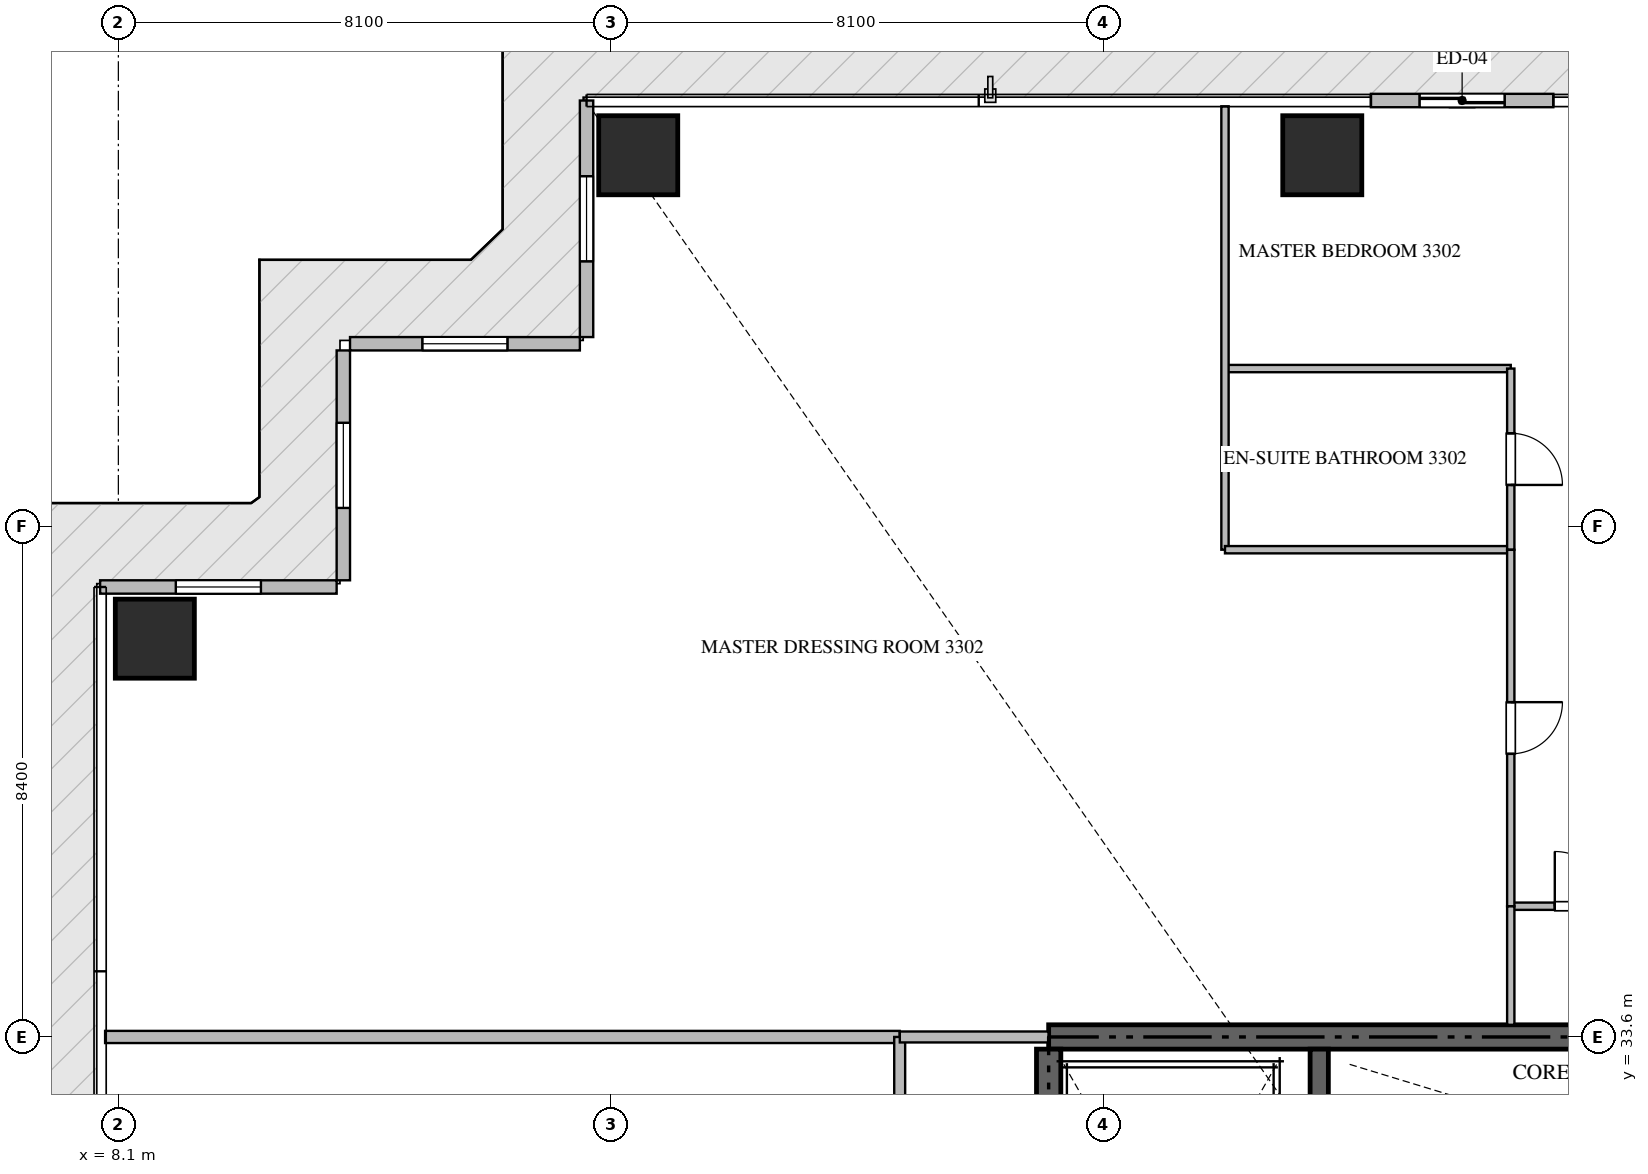
"""IFC4 building model, lengths in metres.
Left out: names, types, materials, properties, quantities, classifications, styles, units other than length and angle.
Written with IfcOpenShell. Run it as: python <this file> out.ifc"""

import sys

from ifc_helpers import new_model, si_unit, direction, frame, frame_2d, origin, origin_2d, place, context, subcontext, project, spatial, rectangle, extrude, source, transform, mapped, element, fill, save


model = new_model("IFC4")
c1 = context("Model", 3, precision=1e-05, world=origin(), true_north=direction((0.0, 1.0)))
c2 = subcontext(c1, "Body", "Model", "MODEL_VIEW")
j1 = project(units=[si_unit("LENGTHUNIT", "METRE"), si_unit("PLANEANGLEUNIT", "RADIAN")], contexts=[c1])
p1 = place(None, origin())
s1 = spatial("IfcSite", under=j1, at=p1, CompositionType="ELEMENT")
p2 = place(p1, origin())
s2 = spatial("IfcBuilding", under=s1, at=p2, CompositionType="ELEMENT")
p3 = place(p2, frame((0.0, 0.0, 135.15)))
s3 = spatial("IfcBuildingStorey", under=s2, at=p3, CompositionType="ELEMENT", Elevation=135.15)
p4 = place(p3, frame((41.4, 33.6, -0.26), z_axis=(0.0, 0.0, 1.0), x_axis=(-1.0, 0.0, 0.0)))
e1 = element("IfcWall", 1, at=p4, inside=s3, PredefinedType="SHEAR", context=c2, shape_type="SweptSolid", body=[
    extrude(rectangle(XDim=18.0, YDim=0.4, at=frame_2d((9.0, 0.0))), origin(), (0.0, 0.0, 1.0), 3.748),
])
p5 = place(p3, frame((23.4, 24.25, -0.26), z_axis=(0.0, 0.0, 1.0), x_axis=(0.0, 1.0, 0.0)))
e2 = element("IfcWall", 2, at=p5, inside=s3, PredefinedType="SHEAR", context=c2, shape_type="SweptSolid", body=[
    extrude(rectangle(XDim=9.15, YDim=0.4, at=frame_2d((4.575, 0.0))), origin(), (0.0, 0.0, 1.0), 3.748),
])
p6 = place(p3, frame((27.85, 23.55, -0.26), z_axis=(0.0, 0.0, 1.0), x_axis=(0.0, 1.0, 0.0)))
e3 = element("IfcWall", 3, at=p6, inside=s3, PredefinedType="SHEAR", context=c2, shape_type="SweptSolid", body=[
    extrude(rectangle(XDim=9.85, YDim=0.3, at=frame_2d((4.925, 0.0))), origin(), (0.0, 0.0, 1.0), 3.748),
])
m1 = source(origin(), c2, "Body", "SweptSolid", [
    extrude(rectangle(XDim=1.3, YDim=1.3, at=origin_2d()), origin(), (0.0, 0.0, 1.0), 3.75),
])
for number, where, z_axis, x_axis in (
    (4, (16.65, 48.1, -0.26), (0.0, 0.0, 1.0), (1.0, 0.0, 0.0)),
    (5, (27.9, 48.1, -0.26), (0.0, 0.0, 1.0), (1.0, 0.0, 0.0)),
    (6, (8.7, 40.15, -0.26), (0.0, 0.0, 1.0), (1.0, 0.0, 0.0)),
):
    element("IfcColumn", number, at=place(p3, frame(where, z_axis=z_axis, x_axis=x_axis)), inside=s3, PredefinedType="COLUMN", context=c2, shape_type="MappedRepresentation", body=[
        mapped(m1, transform((0.0, 0.0, 0.0), scale=1.0)),
    ])
p7 = place(p3, frame((31.7, 49.0, 0.0), z_axis=(0.0, 0.0, 1.0), x_axis=(-1.0, 0.0, 0.0)))
e7 = element("IfcWall", 7, at=p7, inside=s3, PredefinedType="ELEMENTEDWALL", context=c2, shape_type="SweptSolid", body=[
    extrude(rectangle(XDim=3.0, YDim=0.22, at=frame_2d((1.5, 0.0))), origin(), (0.0, 0.0, 1.0), 3.475),
])
p8 = place(p7, frame((0.8, 0.0, 0.0)))
e8 = element("IfcOpeningElement", 8, at=p8, cuts=e7, PredefinedType="OPENING", context=c2, shape_type="SweptSolid", body=[
    extrude(rectangle(XDim=1.4, YDim=2.25, at=frame_2d((0.7, 1.125))), frame((0.0, 0.12, 0.0), z_axis=(0.0, -1.0, 0.0), x_axis=(1.0, 0.0, 0.0)), (0.0, 0.0, 1.0), 0.24),
])
p9 = place(p3, frame((15.8, 49.0, 0.0), z_axis=(0.0, 0.0, 1.0), x_axis=(0.0, -1.0, 0.0)))
e9 = element("IfcWall", 9, at=p9, inside=s3, PredefinedType="ELEMENTEDWALL", context=c2, shape_type="SweptSolid", body=[
    extrude(rectangle(XDim=3.89, YDim=0.22, at=frame_2d((1.945, 0.0))), origin(), (0.0, 0.0, 1.0), 3.475),
])
p10 = place(p9, frame((1.245, 0.0, 0.65)))
e10 = element("IfcOpeningElement", 10, at=p10, cuts=e9, PredefinedType="OPENING", context=c2, shape_type="SweptSolid", body=[
    extrude(rectangle(XDim=1.4, YDim=2.05, at=frame_2d((0.7, 1.025))), frame((0.0, 0.12, 0.0), z_axis=(0.0, -1.0, 0.0), x_axis=(1.0, 0.0, 0.0)), (0.0, 0.0, 1.0), 0.24),
])
p11 = place(p3, frame((15.69, 45.0, 0.0), z_axis=(0.0, 0.0, 1.0), x_axis=(-1.0, 0.0, 0.0)))
e11 = element("IfcWall", 11, at=p11, inside=s3, PredefinedType="ELEMENTEDWALL", context=c2, shape_type="SweptSolid", body=[
    extrude(rectangle(XDim=3.78, YDim=0.22, at=frame_2d((1.89, 0.0))), origin(), (0.0, 0.0, 1.0), 3.475),
])
p12 = place(p11, frame((1.19, 0.0, 0.65)))
e12 = element("IfcOpeningElement", 12, at=p12, cuts=e11, PredefinedType="OPENING", context=c2, shape_type="SweptSolid", body=[
    extrude(rectangle(XDim=1.4, YDim=2.05, at=frame_2d((0.7, 1.025))), frame((0.0, 0.12, 0.0), z_axis=(0.0, -1.0, 0.0), x_axis=(1.0, 0.0, 0.0)), (0.0, 0.0, 1.0), 0.24),
])
p13 = place(p3, frame((11.8, 44.89, 0.0), z_axis=(0.0, 0.0, 1.0), x_axis=(0.0, -1.0, 0.0)))
e13 = element("IfcWall", 13, at=p13, inside=s3, PredefinedType="ELEMENTEDWALL", context=c2, shape_type="SweptSolid", body=[
    extrude(rectangle(XDim=3.78, YDim=0.22, at=frame_2d((1.89, 0.0))), origin(), (0.0, 0.0, 1.0), 3.475),
])
p14 = place(p13, frame((1.19, 0.0, 0.65)))
e14 = element("IfcOpeningElement", 14, at=p14, cuts=e13, PredefinedType="OPENING", context=c2, shape_type="SweptSolid", body=[
    extrude(rectangle(XDim=1.4, YDim=2.05, at=frame_2d((0.7, 1.025))), frame((0.0, 0.12, 0.0), z_axis=(0.0, -1.0, 0.0), x_axis=(1.0, 0.0, 0.0)), (0.0, 0.0, 1.0), 0.24),
])
p15 = place(p3, frame((11.69, 41.0, 0.0), z_axis=(0.0, 0.0, 1.0), x_axis=(-1.0, 0.0, 0.0)))
e15 = element("IfcWall", 15, at=p15, inside=s3, PredefinedType="ELEMENTEDWALL", context=c2, shape_type="SweptSolid", body=[
    extrude(rectangle(XDim=3.89, YDim=0.22, at=frame_2d((1.945, 0.0))), origin(), (0.0, 0.0, 1.0), 3.475),
])
p16 = place(p15, frame((1.245, 0.0, 0.65)))
e16 = element("IfcOpeningElement", 16, at=p16, cuts=e15, PredefinedType="OPENING", context=c2, shape_type="SweptSolid", body=[
    extrude(rectangle(XDim=1.4, YDim=2.05, at=frame_2d((0.7, 1.025))), frame((0.0, 0.12, 0.0), z_axis=(0.0, -1.0, 0.0), x_axis=(1.0, 0.0, 0.0)), (0.0, 0.0, 1.0), 0.24),
])
p17 = place(p3, frame((7.882, 33.6, 0.0), z_axis=(0.0, 0.0, 1.0), x_axis=(1.0, 0.0, 0.0)))
e17 = element("IfcWall", 17, at=p17, inside=s3, PredefinedType="PARTITIONING", context=c2, shape_type="SweptSolid", body=[
    extrude(rectangle(XDim=13.068, YDim=0.2, at=frame_2d((6.534, 0.0))), origin(), (0.0, 0.0, 1.0), 3.49),
])
p18 = place(p3, frame((20.95, 14.9, 0.0), z_axis=(0.0, 0.0, 1.0), x_axis=(0.0, 1.0, 0.0)))
e18 = element("IfcWall", 18, at=p18, inside=s3, PredefinedType="PARTITIONING", context=c2, shape_type="SweptSolid", body=[
    extrude(rectangle(XDim=18.7, YDim=0.18, at=frame_2d((9.35, 0.0))), origin(), (0.0, 0.0, 1.0), 3.49),
])
p19 = place(p18, frame((14.603, 0.0, 0.0)))
e19 = element("IfcOpeningElement", 19, at=p19, cuts=e18, PredefinedType="OPENING", context=c2, shape_type="SweptSolid", body=[
    extrude(rectangle(XDim=1.0, YDim=2.15, at=frame_2d((0.5, 1.075))), frame((0.0, 0.1, 0.0), z_axis=(0.0, -1.0, 0.0), x_axis=(1.0, 0.0, 0.0)), (0.0, 0.0, 1.0), 0.2),
])
p20 = place(p3, frame((20.952, 33.6, 0.0), z_axis=(0.0, 0.0, 1.0), x_axis=(1.0, 0.0, 0.0)))
e20 = element("IfcWall", 20, at=p20, inside=s3, PredefinedType="PARTITIONING", context=c2, shape_type="SweptSolid", body=[
    extrude(rectangle(XDim=2.446, YDim=0.18, at=frame_2d((1.223, 0.0))), origin(), (0.0, 0.0, 1.0), 3.49),
])
p21 = place(p3, frame((31.0, 35.75, 0.0), z_axis=(0.0, 0.0, 1.0), x_axis=(1.0, 0.0, 0.0)))
e21 = element("IfcWall", 21, at=p21, inside=s3, PredefinedType="PARTITIONING", context=c2, shape_type="SweptSolid", body=[
    extrude(rectangle(XDim=2.348, YDim=0.12, at=frame_2d((1.174, 0.0))), origin(), (0.0, 0.0, 1.0), 3.49),
])
p22 = place(p21, frame((0.724, 0.0, 0.0)))
e22 = element("IfcOpeningElement", 22, at=p22, cuts=e21, PredefinedType="OPENING", context=c2, shape_type="SweptSolid", body=[
    extrude(rectangle(XDim=0.9, YDim=2.1, at=frame_2d((0.45, 1.05))), frame((0.0, 0.07, 0.0), z_axis=(0.0, -1.0, 0.0), x_axis=(1.0, 0.0, 0.0)), (0.0, 0.0, 1.0), 0.14),
])
p23 = place(p3, frame((26.3, 44.592, 0.0), z_axis=(0.0, 0.0, 1.0), x_axis=(1.0, 0.0, 0.0)))
e23 = element("IfcWall", 23, at=p23, inside=s3, PredefinedType="PARTITIONING", context=c2, shape_type="SweptSolid", body=[
    extrude(rectangle(XDim=4.7, YDim=0.12, at=frame_2d((2.35, 0.0))), origin(), (0.0, 0.0, 1.0), 3.49),
])
p24 = place(p3, frame((26.3, 48.905, 0.0), z_axis=(0.0, 0.0, 1.0), x_axis=(0.0, -1.0, 0.0)))
e24 = element("IfcWall", 24, at=p24, inside=s3, PredefinedType="PARTITIONING", context=c2, shape_type="SweptSolid", body=[
    extrude(rectangle(XDim=7.292, YDim=0.12, at=frame_2d((3.646, 0.0))), origin(), (0.0, 0.0, 1.0), 3.49),
])
p25 = place(p3, frame((26.3, 41.613, 0.0), z_axis=(0.0, 0.0, 1.0), x_axis=(1.0, 0.0, 0.0)))
e25 = element("IfcWall", 25, at=p25, inside=s3, PredefinedType="PARTITIONING", context=c2, shape_type="SweptSolid", body=[
    extrude(rectangle(XDim=4.7, YDim=0.12, at=frame_2d((2.35, 0.0))), origin(), (0.0, 0.0, 1.0), 3.49),
])
p26 = place(p3, frame((31.0, 44.592, 0.0), z_axis=(0.0, 0.0, 1.0), x_axis=(0.0, -1.0, 0.0)))
e26 = element("IfcWall", 26, at=p26, inside=s3, PredefinedType="PARTITIONING", context=c2, shape_type="SweptSolid", body=[
    extrude(rectangle(XDim=2.979, YDim=0.12, at=frame_2d((1.49, 0.0))), origin(), (0.0, 0.0, 1.0), 3.49),
])
p27 = place(p26, frame((1.064, 0.0, 0.0)))
e27 = element("IfcOpeningElement", 27, at=p27, cuts=e26, PredefinedType="OPENING", context=c2, shape_type="SweptSolid", body=[
    extrude(rectangle(XDim=0.85, YDim=2.1, at=frame_2d((0.425, 1.05))), frame((0.0, 0.07, 0.0), z_axis=(0.0, -1.0, 0.0), x_axis=(1.0, 0.0, 0.0)), (0.0, 0.0, 1.0), 0.14),
])
p28 = place(p3, frame((31.0, 41.611, 0.0), z_axis=(0.0, 0.0, 1.0), x_axis=(0.0, -1.0, 0.0)))
e28 = element("IfcWall", 28, at=p28, inside=s3, PredefinedType="PARTITIONING", context=c2, shape_type="SweptSolid", body=[
    extrude(rectangle(XDim=5.861, YDim=0.12, at=frame_2d((2.931, 0.0))), origin(), (0.0, 0.0, 1.0), 3.49),
])
p29 = place(p28, frame((2.505, 0.0, 0.0)))
e29 = element("IfcOpeningElement", 29, at=p29, cuts=e28, PredefinedType="OPENING", context=c2, shape_type="SweptSolid", body=[
    extrude(rectangle(XDim=0.85, YDim=2.1, at=frame_2d((0.425, 1.05))), frame((0.0, 0.07, 0.0), z_axis=(0.0, -1.0, 0.0), x_axis=(1.0, 0.0, 0.0)), (0.0, 0.0, 1.0), 0.14),
])
p30 = place(p3, frame((31.0, 35.748, 0.0), z_axis=(0.0, 0.0, 1.0), x_axis=(0.0, -1.0, 0.0)))
e30 = element("IfcWall", 30, at=p30, inside=s3, PredefinedType="PARTITIONING", context=c2, shape_type="SweptSolid", body=[
    extrude(rectangle(XDim=1.948, YDim=0.12, at=frame_2d((0.974, 0.0))), origin(), (0.0, 0.0, 1.0), 3.49),
])
m2 = source(origin(), c2, "Body", "SweptSolid", [
    extrude(rectangle(XDim=1.4, YDim=2.25, at=frame_2d((0.7, 1.125))), frame((0.0, 0.025, 0.0), z_axis=(0.0, -1.0, 0.0), x_axis=(1.0, 0.0, 0.0)), (0.0, 0.0, 1.0), 0.05),
])
p31 = place(p8, origin())
e31 = element("IfcDoor", 31, at=p31, inside=s3, OperationType="SLIDING_TO_LEFT", PredefinedType="DOOR", context=c2, shape_type="MappedRepresentation", body=[
    mapped(m2, transform((0.0, 0.0, 0.0), scale=1.0)),
])
fill(e8, e31)
m3 = source(origin(), c2, "Body", "SweptSolid", [
    extrude(rectangle(XDim=1.4, YDim=2.05, at=frame_2d((0.7, 1.025))), frame((0.0, 0.03, 0.0), z_axis=(0.0, -1.0, 0.0), x_axis=(1.0, 0.0, 0.0)), (0.0, 0.0, 1.0), 0.06),
])
p32 = place(p10, origin())
e32 = element("IfcWindow", 32, at=p32, inside=s3, PartitioningType="SINGLE_PANEL", PredefinedType="WINDOW", context=c2, shape_type="MappedRepresentation", body=[
    mapped(m3, transform((0.0, 0.0, 0.0), scale=1.0)),
])
fill(e10, e32)
p33 = place(p12, origin())
e33 = element("IfcWindow", 33, at=p33, inside=s3, PartitioningType="SINGLE_PANEL", PredefinedType="WINDOW", context=c2, shape_type="MappedRepresentation", body=[
    mapped(m3, transform((0.0, 0.0, 0.0), scale=1.0)),
])
fill(e12, e33)
p34 = place(p14, origin())
e34 = element("IfcWindow", 34, at=p34, inside=s3, PartitioningType="SINGLE_PANEL", PredefinedType="WINDOW", context=c2, shape_type="MappedRepresentation", body=[
    mapped(m3, transform((0.0, 0.0, 0.0), scale=1.0)),
])
fill(e14, e34)
p35 = place(p16, origin())
e35 = element("IfcWindow", 35, at=p35, inside=s3, PartitioningType="SINGLE_PANEL", PredefinedType="WINDOW", context=c2, shape_type="MappedRepresentation", body=[
    mapped(m3, transform((0.0, 0.0, 0.0), scale=1.0)),
])
fill(e16, e35)
m4 = source(origin(), c2, "Body", "SweptSolid", [
    extrude(rectangle(XDim=0.9, YDim=2.1, at=frame_2d((0.45, 1.05))), frame((0.0, 0.025, 0.0), z_axis=(0.0, -1.0, 0.0), x_axis=(1.0, 0.0, 0.0)), (0.0, 0.0, 1.0), 0.05),
])
p36 = place(p22, origin())
e36 = element("IfcDoor", 36, at=p36, inside=s3, OperationType="SINGLE_SWING_LEFT", PredefinedType="DOOR", context=c2, shape_type="MappedRepresentation", body=[
    mapped(m4, transform((0.0, 0.0, 0.0), scale=1.0)),
])
fill(e22, e36)
m5 = source(origin(), c2, "Body", "SweptSolid", [
    extrude(rectangle(XDim=0.85, YDim=2.1, at=frame_2d((0.425, 1.05))), frame((0.0, 0.025, 0.0), z_axis=(0.0, -1.0, 0.0), x_axis=(1.0, 0.0, 0.0)), (0.0, 0.0, 1.0), 0.05),
])
p37 = place(p27, origin())
e37 = element("IfcDoor", 37, at=p37, inside=s3, OperationType="SINGLE_SWING_RIGHT", PredefinedType="DOOR", context=c2, shape_type="MappedRepresentation", body=[
    mapped(m5, transform((0.0, 0.0, 0.0), scale=1.0)),
])
fill(e27, e37)
p38 = place(p29, origin())
e38 = element("IfcDoor", 38, at=p38, inside=s3, OperationType="SINGLE_SWING_LEFT", PredefinedType="DOOR", context=c2, shape_type="MappedRepresentation", body=[
    mapped(m5, transform((0.0, 0.0, 0.0), scale=1.0)),
])
fill(e29, e38)
save(model, sys.argv[1])
